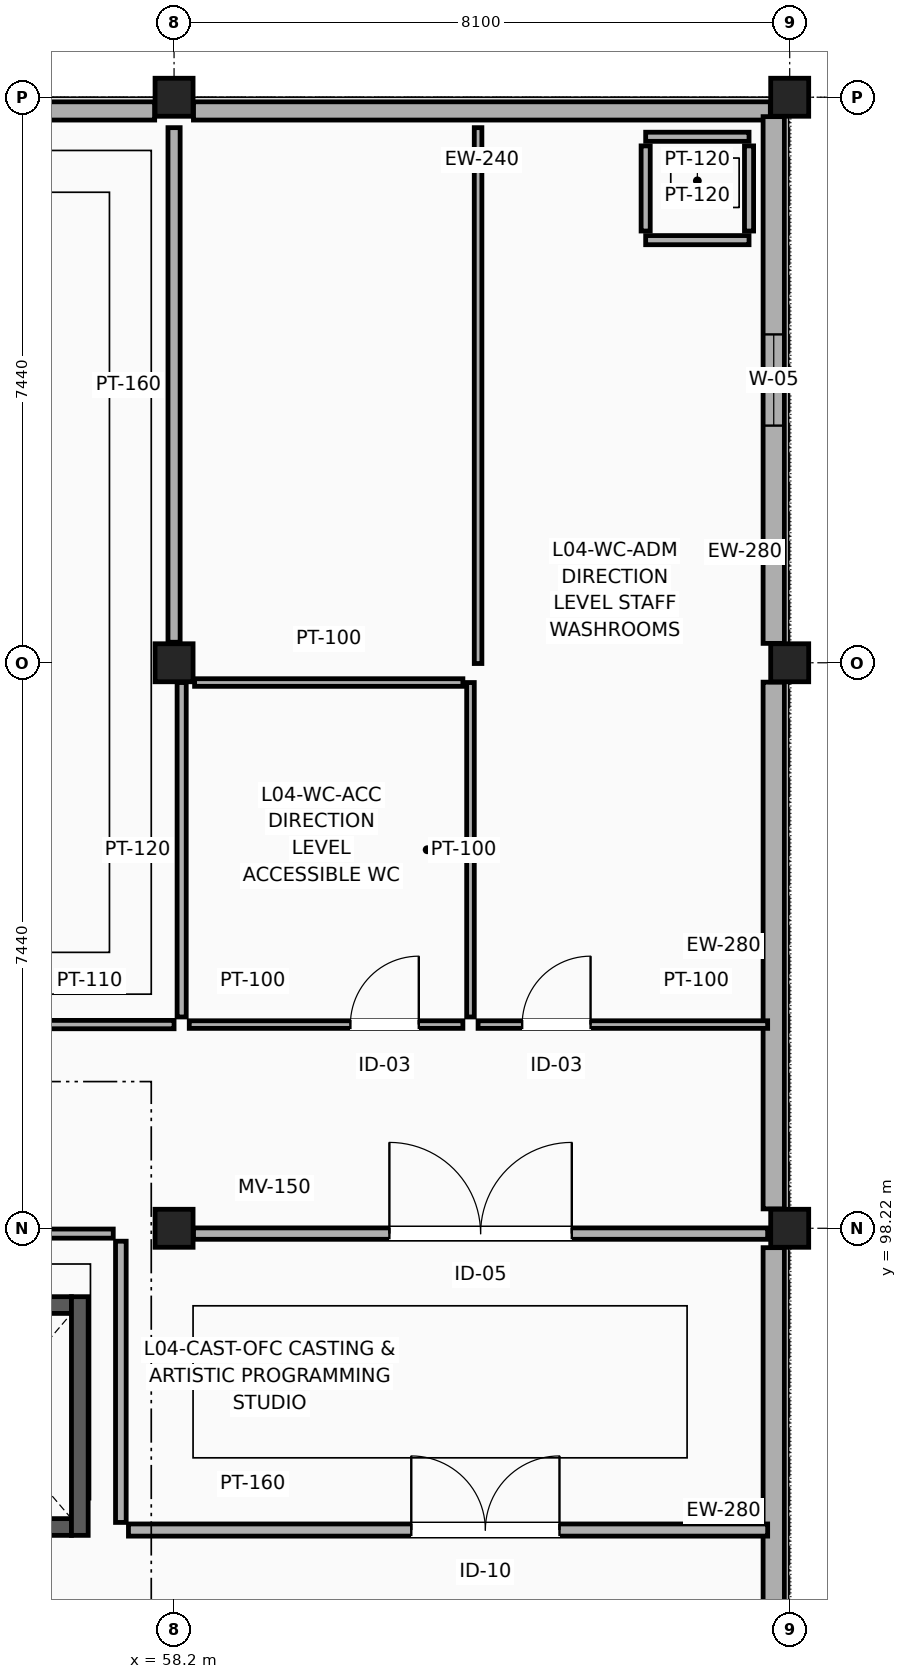
"""IFC4 building model, lengths in metres.
Left out: names, types, materials, properties, quantities, classifications, styles, units other than length and angle.
Written with IfcOpenShell. Run it as: python <this file> out.ifc"""

import sys

from ifc_helpers import new_model, si_unit, direction, frame, frame_2d, origin, origin_2d, place, context, subcontext, project, spatial, rectangle, extrude, element, fill, save


model = new_model("IFC4")
c1 = context("Model", 3, precision=1e-05, world=origin(), true_north=direction((0.0, 1.0)))
c2 = subcontext(c1, "Body", "Model", "MODEL_VIEW")
j1 = project(units=[si_unit("LENGTHUNIT", "METRE"), si_unit("PLANEANGLEUNIT", "RADIAN")], contexts=[c1])
p1 = place(None, origin())
s1 = spatial("IfcSite", under=j1, at=p1, CompositionType="ELEMENT")
p2 = place(p1, origin())
s2 = spatial("IfcBuilding", under=s1, at=p2, CompositionType="ELEMENT")
p3 = place(p2, frame((0.0, 0.0, 19.2)))
s3 = spatial("IfcBuildingStorey", under=s2, at=p3, CompositionType="ELEMENT", Elevation=19.2)
for number, where, z_axis, x_axis in (
    (1, (58.2, 98.22, 0.0), (0.0, 0.0, 1.0), (1.0, 0.0, 0.0)),
    (2, (58.2, 105.66, 0.0), (0.0, 0.0, 1.0), (1.0, 0.0, 0.0)),
    (3, (58.2, 113.1, 0.0), (0.0, 0.0, 1.0), (1.0, 0.0, 0.0)),
    (4, (66.3, 98.22, 0.0), (0.0, 0.0, 1.0), (1.0, 0.0, 0.0)),
    (5, (66.3, 105.66, 0.0), (0.0, 0.0, 1.0), (1.0, 0.0, 0.0)),
    (6, (66.3, 113.1, 0.0), (0.0, 0.0, 1.0), (1.0, 0.0, 0.0)),
):
    element("IfcColumn", number, at=place(p3, frame(where, z_axis=z_axis, x_axis=x_axis)), inside=s3, PredefinedType="COLUMN", context=c2, shape_type="SweptSolid", body=[
        extrude(rectangle(XDim=0.5, YDim=0.5, at=origin_2d()), origin(), (0.0, 0.0, 1.0), 4.2),
    ])
p4 = place(p3, frame((51.855, 112.92, 0.0), z_axis=(0.0, 0.0, 1.0), x_axis=(1.0, 0.0, 0.0)))
e7 = element("IfcWall", 7, at=p4, inside=s3, PredefinedType="SOLIDWALL", context=c2, shape_type="SweptSolid", body=[
    extrude(rectangle(XDim=6.09, YDim=0.24, at=frame_2d((3.045, 0.0))), origin(), (0.0, 0.0, 1.0), 3.097),
])
p5 = place(p3, frame((58.455, 112.92, 0.0), z_axis=(0.0, 0.0, 1.0), x_axis=(1.0, 0.0, 0.0)))
e8 = element("IfcWall", 8, at=p5, inside=s3, PredefinedType="SOLIDWALL", context=c2, shape_type="SweptSolid", body=[
    extrude(rectangle(XDim=7.59, YDim=0.24, at=frame_2d((3.795, 0.0))), origin(), (0.0, 0.0, 1.0), 3.097),
])
p6 = place(p3, frame((66.09, 91.035, 0.0), z_axis=(0.0, 0.0, 1.0), x_axis=(0.0, 1.0, 0.0)))
e9 = element("IfcWall", 9, at=p6, inside=s3, PredefinedType="SOLIDWALL", context=c2, shape_type="SweptSolid", body=[
    extrude(rectangle(XDim=6.93, YDim=0.28, at=frame_2d((3.465, 0.0))), origin(), (0.0, 0.0, 1.0), 3.297),
])
p7 = place(p3, frame((66.09, 98.475, 0.0), z_axis=(0.0, 0.0, 1.0), x_axis=(0.0, 1.0, 0.0)))
e10 = element("IfcWall", 10, at=p7, inside=s3, PredefinedType="SOLIDWALL", context=c2, shape_type="SweptSolid", body=[
    extrude(rectangle(XDim=6.93, YDim=0.28, at=frame_2d((3.465, 0.0))), origin(), (0.0, 0.0, 1.0), 3.347),
])
p8 = place(p3, frame((66.09, 105.915, 0.0), z_axis=(0.0, 0.0, 1.0), x_axis=(0.0, 1.0, 0.0)))
e11 = element("IfcWall", 11, at=p8, inside=s3, PredefinedType="SOLIDWALL", context=c2, shape_type="SweptSolid", body=[
    extrude(rectangle(XDim=6.93, YDim=0.28, at=frame_2d((3.465, 0.0))), origin(), (0.0, 0.0, 1.0), 3.297),
])
p9 = place(p8, frame((2.865, 0.0, 0.95)))
e12 = element("IfcOpeningElement", 12, at=p9, cuts=e11, PredefinedType="OPENING", context=c2, shape_type="SweptSolid", body=[
    extrude(rectangle(XDim=1.2, YDim=1.8, at=frame_2d((0.6, 0.9))), frame((0.0, 0.15, 0.0), z_axis=(0.0, -1.0, 0.0), x_axis=(1.0, 0.0, 0.0)), (0.0, 0.0, 1.0), 0.3),
])
p10 = place(p3, frame((54.55, 94.29, 0.0), z_axis=(0.0, 0.0, 1.0), x_axis=(1.0, 0.0, 0.0)))
e13 = element("IfcWall", 13, at=p10, inside=s3, PredefinedType="SOLIDWALL", context=c2, shape_type="SweptSolid", body=[
    extrude(rectangle(XDim=2.3, YDim=0.22, at=frame_2d((1.15, 0.0))), origin(), (0.0, 0.0, 1.0), 3.965),
])
p11 = place(p10, frame((0.6, 0.0, 0.0)))
e14 = element("IfcOpeningElement", 14, at=p11, cuts=e13, PredefinedType="OPENING", context=c2, shape_type="SweptSolid", body=[
    extrude(rectangle(XDim=1.1, YDim=2.2, at=frame_2d((0.55, 1.1))), frame((0.0, 0.12, 0.0), z_axis=(0.0, -1.0, 0.0), x_axis=(1.0, 0.0, 0.0)), (0.0, 0.0, 1.0), 0.24),
])
p12 = place(p3, frame((54.55, 97.21, 0.0), z_axis=(0.0, 0.0, 1.0), x_axis=(1.0, 0.0, 0.0)))
e15 = element("IfcWall", 15, at=p12, inside=s3, PredefinedType="SOLIDWALL", context=c2, shape_type="SweptSolid", body=[
    extrude(rectangle(XDim=2.3, YDim=0.22, at=frame_2d((1.15, 0.0))), origin(), (0.0, 0.0, 1.0), 3.965),
])
p13 = place(p3, frame((56.96, 94.18, 0.0), z_axis=(0.0, 0.0, 1.0), x_axis=(0.0, 1.0, 0.0)))
e16 = element("IfcWall", 16, at=p13, inside=s3, PredefinedType="SOLIDWALL", context=c2, shape_type="SweptSolid", body=[
    extrude(rectangle(XDim=3.14, YDim=0.22, at=frame_2d((1.57, 0.0))), origin(), (0.0, 0.0, 1.0), 3.965),
])
for number, where, z_axis, x_axis in (
    (17, (64.405, 111.22, 0.0), (0.0, 0.0, 1.0), (1.0, 0.0, 0.0)),
    (18, (64.405, 112.58, 0.0), (0.0, 0.0, 1.0), (1.0, 0.0, 0.0)),
):
    element("IfcWall", number, at=place(p3, frame(where, z_axis=z_axis, x_axis=x_axis)), inside=s3, PredefinedType="PARTITIONING", context=c2, shape_type="SweptSolid", body=[
        extrude(rectangle(XDim=1.36, YDim=0.12, at=frame_2d((0.68, 0.0))), origin(), (0.0, 0.0, 1.0), 3.945),
    ])
for number, where, z_axis, x_axis in (
    (19, (64.405, 111.34, 0.0), (0.0, 0.0, 1.0), (0.0, 1.0, 0.0)),
    (20, (65.765, 111.34, 0.0), (0.0, 0.0, 1.0), (0.0, 1.0, 0.0)),
):
    element("IfcWall", number, at=place(p3, frame(where, z_axis=z_axis, x_axis=x_axis)), inside=s3, PredefinedType="PARTITIONING", context=c2, shape_type="SweptSolid", body=[
        extrude(rectangle(XDim=1.12, YDim=0.12, at=frame_2d((0.56, 0.0))), origin(), (0.0, 0.0, 1.0), 3.945),
    ])
p14 = place(p3, frame((57.6, 94.25, 0.0), z_axis=(0.0, 0.0, 1.0), x_axis=(1.0, 0.0, 0.0)))
e21 = element("IfcWall", 21, at=p14, inside=s3, PredefinedType="PARTITIONING", context=c2, shape_type="SweptSolid", body=[
    extrude(rectangle(XDim=8.41, YDim=0.16, at=frame_2d((4.205, 0.0))), origin(), (0.0, 0.0, 1.0), 3.297),
])
p15 = place(p14, frame((3.721, 0.0, 0.0)))
e22 = element("IfcOpeningElement", 22, at=p15, cuts=e21, PredefinedType="OPENING", context=c2, shape_type="SweptSolid", body=[
    extrude(rectangle(XDim=1.95, YDim=2.45, at=frame_2d((0.975, 1.225))), frame((0.0, 0.09, 0.0), z_axis=(0.0, -1.0, 0.0), x_axis=(1.0, 0.0, 0.0)), (0.0, 0.0, 1.0), 0.18),
])
p16 = place(p3, frame((57.5, 94.35, 0.0), z_axis=(0.0, 0.0, 1.0), x_axis=(0.0, 1.0, 0.0)))
e23 = element("IfcWall", 23, at=p16, inside=s3, PredefinedType="PARTITIONING", context=c2, shape_type="SweptSolid", body=[
    extrude(rectangle(XDim=3.7, YDim=0.14, at=frame_2d((1.85, 0.0))), origin(), (0.0, 0.0, 1.0), 3.147),
])
p17 = place(p3, frame((50.255, 98.15, 0.0), z_axis=(0.0, 0.0, 1.0), x_axis=(1.0, 0.0, 0.0)))
e24 = element("IfcWall", 24, at=p17, inside=s3, PredefinedType="PARTITIONING", context=c2, shape_type="SweptSolid", body=[
    extrude(rectangle(XDim=7.145, YDim=0.12, at=frame_2d((3.573, 0.0))), origin(), (0.0, 0.0, 1.0), 3.147),
])
p18 = place(p17, frame((3.171, 0.0, 0.0)))
e25 = element("IfcOpeningElement", 25, at=p18, cuts=e24, PredefinedType="OPENING", context=c2, shape_type="SweptSolid", body=[
    extrude(rectangle(XDim=1.6, YDim=2.3, at=frame_2d((0.8, 1.15))), frame((0.0, 0.07, 0.0), z_axis=(0.0, -1.0, 0.0), x_axis=(1.0, 0.0, 0.0)), (0.0, 0.0, 1.0), 0.14),
])
p19 = place(p3, frame((58.455, 98.15, 0.0), z_axis=(0.0, 0.0, 1.0), x_axis=(1.0, 0.0, 0.0)))
e26 = element("IfcWall", 26, at=p19, inside=s3, PredefinedType="MOVABLE", context=c2, shape_type="SweptSolid", body=[
    extrude(rectangle(XDim=7.555, YDim=0.15, at=frame_2d((3.777, 0.0))), origin(), (0.0, 0.0, 1.0), 3.447),
])
p20 = place(p19, frame((2.578, 0.0, 0.0)))
e27 = element("IfcOpeningElement", 27, at=p20, cuts=e26, PredefinedType="OPENING", context=c2, shape_type="SweptSolid", body=[
    extrude(rectangle(XDim=2.4, YDim=2.8, at=frame_2d((1.2, 1.4))), frame((0.0, 0.085, 0.0), z_axis=(0.0, -1.0, 0.0), x_axis=(1.0, 0.0, 0.0)), (0.0, 0.0, 1.0), 0.17),
])
p21 = place(p3, frame((53.0, 100.9, 0.0), z_axis=(0.0, 0.0, 1.0), x_axis=(1.0, 0.0, 0.0)))
e28 = element("IfcWall", 28, at=p21, inside=s3, PredefinedType="PARTITIONING", context=c2, shape_type="SweptSolid", body=[
    extrude(rectangle(XDim=5.2, YDim=0.11, at=frame_2d((2.6, 0.0))), origin(), (0.0, 0.0, 1.0), 3.587),
])
p22 = place(p21, frame((0.58, 0.0, 0.0)))
e29 = element("IfcOpeningElement", 29, at=p22, cuts=e28, PredefinedType="OPENING", context=c2, shape_type="SweptSolid", body=[
    extrude(rectangle(XDim=1.95, YDim=2.45, at=frame_2d((0.975, 1.225))), frame((0.0, 0.065, 0.0), z_axis=(0.0, -1.0, 0.0), x_axis=(1.0, 0.0, 0.0)), (0.0, 0.0, 1.0), 0.13),
])
p23 = place(p3, frame((58.4, 100.9, 0.0), z_axis=(0.0, 0.0, 1.0), x_axis=(1.0, 0.0, 0.0)))
e30 = element("IfcWall", 30, at=p23, inside=s3, PredefinedType="PARTITIONING", context=c2, shape_type="SweptSolid", body=[
    extrude(rectangle(XDim=3.6, YDim=0.1, at=frame_2d((1.8, 0.0))), origin(), (0.0, 0.0, 1.0), 3.587),
])
p24 = place(p23, frame((2.12, 0.0, 0.0)))
e31 = element("IfcOpeningElement", 31, at=p24, cuts=e30, PredefinedType="OPENING", context=c2, shape_type="SweptSolid", body=[
    extrude(rectangle(XDim=0.9, YDim=2.1, at=frame_2d((0.45, 1.05))), frame((0.0, 0.06, 0.0), z_axis=(0.0, -1.0, 0.0), x_axis=(1.0, 0.0, 0.0)), (0.0, 0.0, 1.0), 0.12),
])
p25 = place(p3, frame((62.2, 100.9, 0.0), z_axis=(0.0, 0.0, 1.0), x_axis=(1.0, 0.0, 0.0)))
e32 = element("IfcWall", 32, at=p25, inside=s3, PredefinedType="PARTITIONING", context=c2, shape_type="SweptSolid", body=[
    extrude(rectangle(XDim=3.81, YDim=0.1, at=frame_2d((1.905, 0.0))), origin(), (0.0, 0.0, 1.0), 3.547),
])
p26 = place(p25, frame((0.58, 0.0, 0.0)))
e33 = element("IfcOpeningElement", 33, at=p26, cuts=e32, PredefinedType="OPENING", context=c2, shape_type="SweptSolid", body=[
    extrude(rectangle(XDim=0.9, YDim=2.1, at=frame_2d((0.45, 1.05))), frame((0.0, 0.06, 0.0), z_axis=(0.0, -1.0, 0.0), x_axis=(1.0, 0.0, 0.0)), (0.0, 0.0, 1.0), 0.12),
])
p27 = place(p3, frame((58.3, 101.0, 0.0), z_axis=(0.0, 0.0, 1.0), x_axis=(0.0, 1.0, 0.0)))
e34 = element("IfcWall", 34, at=p27, inside=s3, PredefinedType="PARTITIONING", context=c2, shape_type="SweptSolid", body=[
    extrude(rectangle(XDim=4.4, YDim=0.12, at=frame_2d((2.2, 0.0))), origin(), (0.0, 0.0, 1.0), 3.637),
])
p28 = place(p3, frame((62.1, 101.0, 0.0), z_axis=(0.0, 0.0, 1.0), x_axis=(0.0, 1.0, 0.0)))
e35 = element("IfcWall", 35, at=p28, inside=s3, PredefinedType="PARTITIONING", context=c2, shape_type="SweptSolid", body=[
    extrude(rectangle(XDim=4.4, YDim=0.1, at=frame_2d((2.2, 0.0))), origin(), (0.0, 0.0, 1.0), 3.945),
])
p29 = place(p3, frame((58.2, 105.93, 0.0), z_axis=(0.0, 0.0, 1.0), x_axis=(0.0, 1.0, 0.0)))
e36 = element("IfcWall", 36, at=p29, inside=s3, PredefinedType="PARTITIONING", context=c2, shape_type="SweptSolid", body=[
    extrude(rectangle(XDim=6.77, YDim=0.16, at=frame_2d((3.385, 0.0))), origin(), (0.0, 0.0, 1.0), 3.297),
])
p30 = place(p3, frame((58.47, 105.4, 0.0), z_axis=(0.0, 0.0, 1.0), x_axis=(1.0, 0.0, 0.0)))
e37 = element("IfcWall", 37, at=p30, inside=s3, PredefinedType="PARTITIONING", context=c2, shape_type="SweptSolid", body=[
    extrude(rectangle(XDim=3.53, YDim=0.1, at=frame_2d((1.765, 0.0))), origin(), (0.0, 0.0, 1.0), 3.587),
])
p31 = place(p3, frame((62.2, 105.65, 0.0), z_axis=(0.0, 0.0, 1.0), x_axis=(0.0, 1.0, 0.0)))
e38 = element("IfcWall", 38, at=p31, inside=s3, PredefinedType="PARTITIONING", context=c2, shape_type="SweptSolid", body=[
    extrude(rectangle(XDim=7.05, YDim=0.1, at=frame_2d((3.525, 0.0))), origin(), (0.0, 0.0, 1.0), 3.447),
])
p32 = place(p9, origin())
e39 = element("IfcWindow", 39, at=p32, inside=s3, PartitioningType="SINGLE_PANEL", PredefinedType="WINDOW", context=c2, shape_type="SweptSolid", body=[
    extrude(rectangle(XDim=1.2, YDim=1.8, at=frame_2d((0.6, 0.9))), frame((0.0, 0.03, 0.0), z_axis=(0.0, -1.0, 0.0), x_axis=(1.0, 0.0, 0.0)), (0.0, 0.0, 1.0), 0.06),
])
fill(e12, e39)
p33 = place(p15, origin())
e40 = element("IfcDoor", 40, at=p33, inside=s3, OperationType="DOUBLE_DOOR_SINGLE_SWING", PredefinedType="DOOR", context=c2, shape_type="SweptSolid", body=[
    extrude(rectangle(XDim=1.95, YDim=2.45, at=frame_2d((0.975, 1.225))), frame((0.0, 0.025, 0.0), z_axis=(0.0, -1.0, 0.0), x_axis=(1.0, 0.0, 0.0)), (0.0, 0.0, 1.0), 0.05),
])
fill(e22, e40)
p34 = place(p20, origin())
e41 = element("IfcDoor", 41, at=p34, inside=s3, OperationType="DOUBLE_DOOR_SINGLE_SWING", PredefinedType="DOOR", context=c2, shape_type="SweptSolid", body=[
    extrude(rectangle(XDim=2.4, YDim=2.8, at=frame_2d((1.2, 1.4))), frame((0.0, 0.025, 0.0), z_axis=(0.0, -1.0, 0.0), x_axis=(1.0, 0.0, 0.0)), (0.0, 0.0, 1.0), 0.05),
])
fill(e27, e41)
p35 = place(p24, origin())
e42 = element("IfcDoor", 42, at=p35, inside=s3, OperationType="SINGLE_SWING_RIGHT", PredefinedType="DOOR", context=c2, shape_type="SweptSolid", body=[
    extrude(rectangle(XDim=0.9, YDim=2.1, at=frame_2d((0.45, 1.05))), frame((0.0, 0.025, 0.0), z_axis=(0.0, -1.0, 0.0), x_axis=(1.0, 0.0, 0.0)), (0.0, 0.0, 1.0), 0.05),
])
fill(e31, e42)
p36 = place(p26, origin())
e43 = element("IfcDoor", 43, at=p36, inside=s3, OperationType="SINGLE_SWING_RIGHT", PredefinedType="DOOR", context=c2, shape_type="SweptSolid", body=[
    extrude(rectangle(XDim=0.9, YDim=2.1, at=frame_2d((0.45, 1.05))), frame((0.0, 0.025, 0.0), z_axis=(0.0, -1.0, 0.0), x_axis=(1.0, 0.0, 0.0)), (0.0, 0.0, 1.0), 0.05),
])
fill(e33, e43)
save(model, sys.argv[1])
